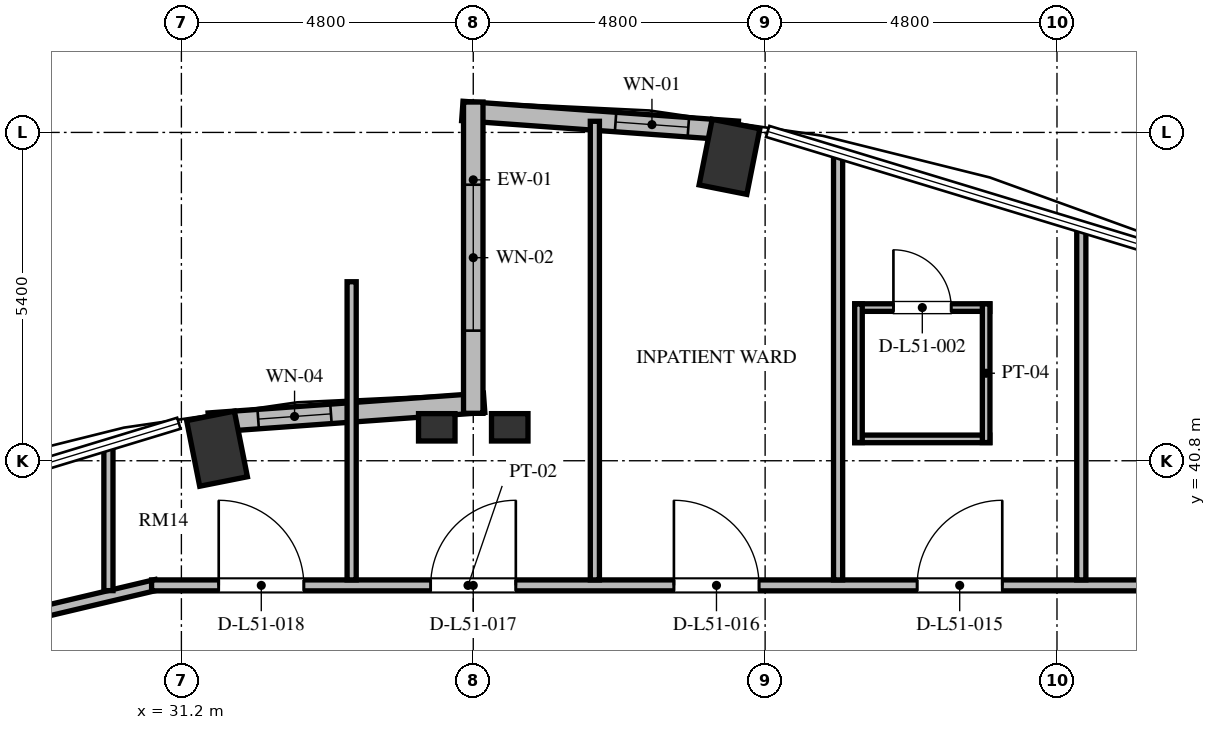
"""IFC4 building model, lengths in metres.
Left out: names, types, materials, properties, quantities, classifications, styles, units other than length and angle.
Written with IfcOpenShell. Run it as: python <this file> out.ifc"""

import sys

from ifc_helpers import new_model, si_unit, direction, frame, frame_2d, origin, origin_2d, place, context, subcontext, project, spatial, rectangle, extrude, element, fill, save


model = new_model("IFC4")
c1 = context("Model", 3, precision=1e-05, world=origin(), true_north=direction((0.0, 1.0)))
c2 = subcontext(c1, "Body", "Model", "MODEL_VIEW")
j1 = project(units=[si_unit("LENGTHUNIT", "METRE"), si_unit("PLANEANGLEUNIT", "RADIAN")], contexts=[c1])
p1 = place(None, origin())
s1 = spatial("IfcSite", under=j1, at=p1, CompositionType="ELEMENT")
p2 = place(p1, origin())
s2 = spatial("IfcBuilding", under=s1, at=p2, CompositionType="ELEMENT")
p3 = place(p2, frame((0.0, 0.0, 198.48)))
s3 = spatial("IfcBuildingStorey", under=s2, at=p3, CompositionType="ELEMENT", Elevation=198.48)
for number, where, z_axis, x_axis in (
    (1, (40.214, 45.798, 0.0), (0.0, 0.0, 1.0), (0.195, 0.981, 0.0)),
    (2, (31.786, 40.998, 0.0), (0.0, 0.0, 1.0), (-0.195, 0.981, 0.0)),
):
    element("IfcColumn", number, at=place(p3, frame(where, z_axis=z_axis, x_axis=x_axis)), inside=s3, PredefinedType="COLUMN", context=c2, shape_type="SweptSolid", body=[
        extrude(rectangle(XDim=1.1, YDim=0.8, at=origin_2d()), origin(), (0.0, 0.0, 1.0), 3.648),
    ])
for number, where, z_axis, x_axis in (
    (3, (35.4, 41.35, 0.0), (0.0, 0.0, 1.0), (1.0, 0.0, 0.0)),
    (4, (36.6, 41.35, 0.0), (0.0, 0.0, 1.0), (1.0, 0.0, 0.0)),
):
    element("IfcColumn", number, at=place(p3, frame(where, z_axis=z_axis, x_axis=x_axis)), inside=s3, PredefinedType="PILASTER", context=c2, shape_type="SweptSolid", body=[
        extrude(rectangle(XDim=0.6, YDim=0.45, at=origin_2d()), origin(), (0.0, 0.0, 1.0), 3.648),
    ])
p4 = place(p3, frame((40.35, 46.226, 0.0), z_axis=(0.0, 0.0, 1.0), x_axis=(-0.997409061056, 0.071938619141, 0.0)))
e5 = element("IfcWall", 5, at=p4, inside=s3, PredefinedType="SOLIDWALL", context=c2, shape_type="SweptSolid", body=[
    extrude(rectangle(XDim=4.541, YDim=0.32, at=frame_2d((2.271, 0.0))), origin(), (0.0, 0.0, 1.0), 3.448),
])
p5 = place(p4, frame((0.815, 0.0, 0.85)))
e6 = element("IfcOpeningElement", 6, at=p5, cuts=e5, PredefinedType="OPENING", context=c2, shape_type="SweptSolid", body=[
    extrude(rectangle(XDim=1.2, YDim=2.2, at=frame_2d((0.6, 1.1))), frame((0.0, 0.17, 0.0), z_axis=(0.0, -1.0, 0.0), x_axis=(1.0, 0.0, 0.0)), (0.0, 0.0, 1.0), 0.34),
])
p6 = place(p3, frame((36.179, 41.753, 0.0), z_axis=(0.0, 0.0, 1.0), x_axis=(-0.997408782787, -0.071942477163, 0.0)))
e7 = element("IfcWall", 7, at=p6, inside=s3, PredefinedType="SOLIDWALL", context=c2, shape_type="SweptSolid", body=[
    extrude(rectangle(XDim=4.541, YDim=0.32, at=frame_2d((2.27, 0.0))), origin(), (0.0, 0.0, 1.0), 3.448),
])
p7 = place(p6, frame((2.526, 0.0, 0.85)))
e8 = element("IfcOpeningElement", 8, at=p7, cuts=e7, PredefinedType="OPENING", context=c2, shape_type="SweptSolid", body=[
    extrude(rectangle(XDim=1.2, YDim=1.8, at=frame_2d((0.6, 0.9))), frame((0.0, 0.17, 0.0), z_axis=(0.0, -1.0, 0.0), x_axis=(1.0, 0.0, 0.0)), (0.0, 0.0, 1.0), 0.34),
])
p8 = place(p3, frame((36.0, 46.7, 0.0), z_axis=(0.0, 0.0, 1.0), x_axis=(0.0, -1.0, 0.0)))
e9 = element("IfcWall", 9, at=p8, inside=s3, PredefinedType="SOLIDWALL", context=c2, shape_type="SweptSolid", body=[
    extrude(rectangle(XDim=5.12, YDim=0.32, at=frame_2d((2.56, 0.0))), origin(), (0.0, 0.0, 1.0), 3.448),
])
p9 = place(p8, frame((1.36, 0.0, 0.84)))
e10 = element("IfcOpeningElement", 10, at=p9, cuts=e9, PredefinedType="OPENING", context=c2, shape_type="SweptSolid", body=[
    extrude(rectangle(XDim=2.4, YDim=2.04, at=frame_2d((1.2, 1.02))), frame((0.0, 0.17, 0.0), z_axis=(0.0, -1.0, 0.0), x_axis=(1.0, 0.0, 0.0)), (0.0, 0.0, 1.0), 0.34),
])
p10 = place(p3, frame((28.476, 38.211, 0.0), z_axis=(0.0, 0.0, 1.0), x_axis=(0.973030562203, 0.230676234189, 0.0)))
e11 = element("IfcWall", 11, at=p10, inside=s3, PredefinedType="PARTITIONING", context=c2, shape_type="SweptSolid", body=[
    extrude(rectangle(XDim=2.377, YDim=0.18, at=frame_2d((1.188, 0.0))), origin(), (0.0, 0.0, 1.0), 3.448),
])
p11 = place(p3, frame((30.71, 38.75, 0.0), z_axis=(0.0, 0.0, 1.0), x_axis=(1.0, 0.0, 0.0)))
e12 = element("IfcWall", 12, at=p11, inside=s3, PredefinedType="PARTITIONING", context=c2, shape_type="SweptSolid", body=[
    extrude(rectangle(XDim=20.815, YDim=0.18, at=frame_2d((10.408, 0.0))), origin(), (0.0, 0.0, 1.0), 3.073),
])
p12 = place(p11, frame((17.194, 0.0, 0.0)))
e13 = element("IfcOpeningElement", 13, at=p12, cuts=e12, PredefinedType="OPENING", context=c2, shape_type="SweptSolid", body=[
    extrude(rectangle(XDim=1.4, YDim=2.2, at=frame_2d((0.7, 1.1))), frame((0.0, 0.1, 0.0), z_axis=(0.0, -1.0, 0.0), x_axis=(1.0, 0.0, 0.0)), (0.0, 0.0, 1.0), 0.2),
])
p13 = place(p11, frame((12.59, 0.0, 0.0)))
e14 = element("IfcOpeningElement", 14, at=p13, cuts=e12, PredefinedType="OPENING", context=c2, shape_type="SweptSolid", body=[
    extrude(rectangle(XDim=1.4, YDim=2.2, at=frame_2d((0.7, 1.1))), frame((0.0, 0.1, 0.0), z_axis=(0.0, -1.0, 0.0), x_axis=(1.0, 0.0, 0.0)), (0.0, 0.0, 1.0), 0.2),
])
p14 = place(p11, frame((8.59, 0.0, 0.0)))
e15 = element("IfcOpeningElement", 15, at=p14, cuts=e12, PredefinedType="OPENING", context=c2, shape_type="SweptSolid", body=[
    extrude(rectangle(XDim=1.4, YDim=2.2, at=frame_2d((0.7, 1.1))), frame((0.0, 0.1, 0.0), z_axis=(0.0, -1.0, 0.0), x_axis=(1.0, 0.0, 0.0)), (0.0, 0.0, 1.0), 0.2),
])
p15 = place(p11, frame((4.59, 0.0, 0.0)))
e16 = element("IfcOpeningElement", 16, at=p15, cuts=e12, PredefinedType="OPENING", context=c2, shape_type="SweptSolid", body=[
    extrude(rectangle(XDim=1.4, YDim=2.2, at=frame_2d((0.7, 1.1))), frame((0.0, 0.1, 0.0), z_axis=(0.0, -1.0, 0.0), x_axis=(1.0, 0.0, 0.0)), (0.0, 0.0, 1.0), 0.2),
])
p16 = place(p11, frame((1.104, 0.0, 0.0)))
e17 = element("IfcOpeningElement", 17, at=p16, cuts=e12, PredefinedType="OPENING", context=c2, shape_type="SweptSolid", body=[
    extrude(rectangle(XDim=1.4, YDim=2.2, at=frame_2d((0.7, 1.1))), frame((0.0, 0.1, 0.0), z_axis=(0.0, -1.0, 0.0), x_axis=(1.0, 0.0, 0.0)), (0.0, 0.0, 1.0), 0.2),
])
p17 = place(p3, frame((30.0, 38.664, 0.0), z_axis=(0.0, 0.0, 1.0), x_axis=(0.0, 1.0, 0.0)))
e18 = element("IfcWall", 18, at=p17, inside=s3, PredefinedType="PARTITIONING", context=c2, shape_type="SweptSolid", body=[
    extrude(rectangle(XDim=2.384, YDim=0.15, at=frame_2d((1.192, 0.0))), origin(), (0.0, 0.0, 1.0), 3.448),
])
p18 = place(p3, frame((34.0, 38.84, 0.0), z_axis=(0.0, 0.0, 1.0), x_axis=(0.0, 1.0, 0.0)))
e19 = element("IfcWall", 19, at=p18, inside=s3, PredefinedType="PARTITIONING", context=c2, shape_type="SweptSolid", body=[
    extrude(rectangle(XDim=4.904, YDim=0.15, at=frame_2d((2.452, 0.0))), origin(), (0.0, 0.0, 1.0), 3.448),
])
p19 = place(p3, frame((38.0, 38.84, 0.0), z_axis=(0.0, 0.0, 1.0), x_axis=(0.0, 1.0, 0.0)))
e20 = element("IfcWall", 20, at=p19, inside=s3, PredefinedType="PARTITIONING", context=c2, shape_type="SweptSolid", body=[
    extrude(rectangle(XDim=7.543, YDim=0.15, at=frame_2d((3.771, 0.0))), origin(), (0.0, 0.0, 1.0), 3.448),
])
p20 = place(p3, frame((42.0, 38.84, 0.0), z_axis=(0.0, 0.0, 1.0), x_axis=(0.0, 1.0, 0.0)))
e21 = element("IfcWall", 21, at=p20, inside=s3, PredefinedType="PARTITIONING", context=c2, shape_type="SweptSolid", body=[
    extrude(rectangle(XDim=7.008, YDim=0.15, at=frame_2d((3.504, 0.0))), origin(), (0.0, 0.0, 1.0), 3.448),
])
p21 = place(p3, frame((46.0, 38.84, 0.0), z_axis=(0.0, 0.0, 1.0), x_axis=(0.0, 1.0, 0.0)))
e22 = element("IfcWall", 22, at=p21, inside=s3, PredefinedType="PARTITIONING", context=c2, shape_type="SweptSolid", body=[
    extrude(rectangle(XDim=5.793, YDim=0.15, at=frame_2d((2.896, 0.0))), origin(), (0.0, 0.0, 1.0), 3.448),
])
p22 = place(p3, frame((42.275, 43.319, 0.0), z_axis=(0.0, 0.0, 1.0), x_axis=(1.0, 0.0, 0.0)))
e23 = element("IfcWall", 23, at=p22, inside=s3, PredefinedType="PARTITIONING", context=c2, shape_type="SweptSolid", body=[
    extrude(rectangle(XDim=2.22, YDim=0.125, at=frame_2d((1.11, 0.0))), origin(), (0.0, 0.0, 1.0), 3.448),
])
p23 = place(p22, frame((0.635, 0.0, 0.0)))
e24 = element("IfcOpeningElement", 24, at=p23, cuts=e23, PredefinedType="OPENING", context=c2, shape_type="SweptSolid", body=[
    extrude(rectangle(XDim=0.95, YDim=2.1, at=frame_2d((0.475, 1.05))), frame((0.0, 0.073, 0.0), z_axis=(0.0, -1.0, 0.0), x_axis=(1.0, 0.0, 0.0)), (0.0, 0.0, 1.0), 0.145),
])
p24 = place(p3, frame((42.275, 41.159, 0.0), z_axis=(0.0, 0.0, 1.0), x_axis=(1.0, 0.0, 0.0)))
e25 = element("IfcWall", 25, at=p24, inside=s3, PredefinedType="PARTITIONING", context=c2, shape_type="SweptSolid", body=[
    extrude(rectangle(XDim=2.22, YDim=0.125, at=frame_2d((1.11, 0.0))), origin(), (0.0, 0.0, 1.0), 3.073),
])
for number, where, z_axis, x_axis in (
    (26, (44.435, 41.099, 0.0), (0.0, 0.0, 1.0), (0.0, 1.0, 0.0)),
    (27, (42.335, 41.099, 0.0), (0.0, 0.0, 1.0), (0.0, 1.0, 0.0)),
):
    element("IfcWall", number, at=place(p3, frame(where, z_axis=z_axis, x_axis=x_axis)), inside=s3, PredefinedType="PARTITIONING", context=c2, shape_type="SweptSolid", body=[
        extrude(rectangle(XDim=2.28, YDim=0.125, at=frame_2d((1.14, 0.0))), origin(), (0.0, 0.0, 1.0), 3.448),
    ])
p25 = place(p5, origin())
e28 = element("IfcWindow", 28, at=p25, inside=s3, PartitioningType="SINGLE_PANEL", PredefinedType="WINDOW", context=c2, shape_type="SweptSolid", body=[
    extrude(rectangle(XDim=1.2, YDim=2.2, at=frame_2d((0.6, 1.1))), frame((0.0, 0.03, 0.0), z_axis=(0.0, -1.0, 0.0), x_axis=(1.0, 0.0, 0.0)), (0.0, 0.0, 1.0), 0.06),
])
fill(e6, e28)
p26 = place(p7, origin())
e29 = element("IfcWindow", 29, at=p26, inside=s3, PartitioningType="SINGLE_PANEL", PredefinedType="WINDOW", context=c2, shape_type="SweptSolid", body=[
    extrude(rectangle(XDim=1.2, YDim=1.8, at=frame_2d((0.6, 0.9))), frame((0.0, 0.03, 0.0), z_axis=(0.0, -1.0, 0.0), x_axis=(1.0, 0.0, 0.0)), (0.0, 0.0, 1.0), 0.06),
])
fill(e8, e29)
p27 = place(p9, origin())
e30 = element("IfcWindow", 30, at=p27, inside=s3, PartitioningType="SINGLE_PANEL", PredefinedType="WINDOW", context=c2, shape_type="SweptSolid", body=[
    extrude(rectangle(XDim=2.4, YDim=2.04, at=frame_2d((1.2, 1.02))), frame((0.0, 0.03, 0.0), z_axis=(0.0, -1.0, 0.0), x_axis=(1.0, 0.0, 0.0)), (0.0, 0.0, 1.0), 0.06),
])
fill(e10, e30)
p28 = place(p23, origin())
e31 = element("IfcDoor", 31, at=p28, inside=s3, OperationType="SINGLE_SWING_LEFT", PredefinedType="DOOR", context=c2, shape_type="SweptSolid", body=[
    extrude(rectangle(XDim=0.95, YDim=2.1, at=frame_2d((0.475, 1.05))), frame((0.0, 0.025, 0.0), z_axis=(0.0, -1.0, 0.0), x_axis=(1.0, 0.0, 0.0)), (0.0, 0.0, 1.0), 0.05),
])
fill(e24, e31)
p29 = place(p13, origin())
e32 = element("IfcDoor", 32, at=p29, inside=s3, OperationType="SINGLE_SWING_RIGHT", PredefinedType="DOOR", context=c2, shape_type="SweptSolid", body=[
    extrude(rectangle(XDim=1.4, YDim=2.2, at=frame_2d((0.7, 1.1))), frame((0.0, 0.025, 0.0), z_axis=(0.0, -1.0, 0.0), x_axis=(1.0, 0.0, 0.0)), (0.0, 0.0, 1.0), 0.05),
])
fill(e14, e32)
p30 = place(p14, origin())
e33 = element("IfcDoor", 33, at=p30, inside=s3, OperationType="SINGLE_SWING_LEFT", PredefinedType="DOOR", context=c2, shape_type="SweptSolid", body=[
    extrude(rectangle(XDim=1.4, YDim=2.2, at=frame_2d((0.7, 1.1))), frame((0.0, 0.025, 0.0), z_axis=(0.0, -1.0, 0.0), x_axis=(1.0, 0.0, 0.0)), (0.0, 0.0, 1.0), 0.05),
])
fill(e15, e33)
p31 = place(p15, origin())
e34 = element("IfcDoor", 34, at=p31, inside=s3, OperationType="SINGLE_SWING_RIGHT", PredefinedType="DOOR", context=c2, shape_type="SweptSolid", body=[
    extrude(rectangle(XDim=1.4, YDim=2.2, at=frame_2d((0.7, 1.1))), frame((0.0, 0.025, 0.0), z_axis=(0.0, -1.0, 0.0), x_axis=(1.0, 0.0, 0.0)), (0.0, 0.0, 1.0), 0.05),
])
fill(e16, e34)
p32 = place(p16, origin())
e35 = element("IfcDoor", 35, at=p32, inside=s3, OperationType="SINGLE_SWING_LEFT", PredefinedType="DOOR", context=c2, shape_type="SweptSolid", body=[
    extrude(rectangle(XDim=1.4, YDim=2.2, at=frame_2d((0.7, 1.1))), frame((0.0, 0.025, 0.0), z_axis=(0.0, -1.0, 0.0), x_axis=(1.0, 0.0, 0.0)), (0.0, 0.0, 1.0), 0.05),
])
fill(e17, e35)
save(model, sys.argv[1])
